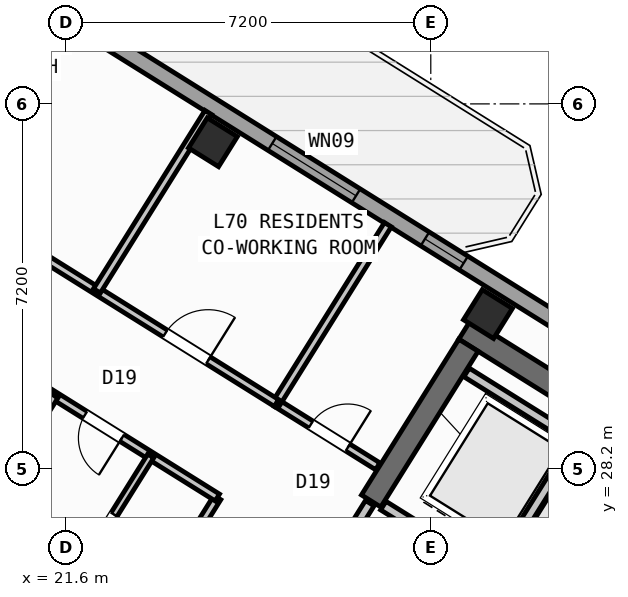
"""IFC4 building model, lengths in metres.
Left out: names, types, materials, properties, quantities, classifications, styles, units other than length and angle.
Written with IfcOpenShell. Run it as: python <this file> out.ifc"""

import sys

from ifc_helpers import new_model, si_unit, direction, frame, frame_2d, origin, origin_2d, place, context, subcontext, project, spatial, rectangle, hollow_rectangle, extrude, source, transform, mapped, element, fill, save


model = new_model("IFC4")
c1 = context("Model", 3, precision=1e-05, world=origin(), true_north=direction((0.0, 1.0)))
c2 = subcontext(c1, "Body", "Model", "MODEL_VIEW")
j1 = project(units=[si_unit("LENGTHUNIT", "METRE"), si_unit("PLANEANGLEUNIT", "RADIAN")], contexts=[c1])
p1 = place(None, origin())
s1 = spatial("IfcSite", under=j1, at=p1, CompositionType="ELEMENT")
p2 = place(p1, origin())
s2 = spatial("IfcBuilding", under=s1, at=p2, CompositionType="ELEMENT")
p3 = place(p2, frame((0.0, 0.0, 277.2)))
s3 = spatial("IfcBuildingStorey", under=s2, at=p3, CompositionType="ELEMENT", Elevation=277.2)
p4 = place(p3, frame((40.531, 24.036, 0.0), z_axis=(0.0, 0.0, 1.0), x_axis=(-0.848048787466, 0.529918157905, 0.0)))
e1 = element("IfcWall", 1, at=p4, inside=s3, PredefinedType="SHEAR", context=c2, shape_type="SweptSolid", body=[
    extrude(rectangle(XDim=13.04, YDim=0.45, at=frame_2d((6.52, 0.0))), origin(), (0.0, 0.0, 1.0), 3.35),
])
p5 = place(p3, frame((29.544, 30.636, 0.0), z_axis=(0.0, 0.0, 1.0), x_axis=(-0.529902075036, -0.848058836916, 0.0)))
e2 = element("IfcWall", 2, at=p5, inside=s3, PredefinedType="SHEAR", context=c2, shape_type="SweptSolid", body=[
    extrude(rectangle(XDim=3.625, YDim=0.45, at=frame_2d((1.812, 0.0))), origin(), (0.0, 0.0, 1.0), 3.35),
])
m1 = source(origin(), c2, "Body", "SweptSolid", [
    extrude(hollow_rectangle(XDim=0.7, YDim=0.7, WallThickness=0.028, at=origin_2d()), origin(), (0.0, 0.0, 1.0), 3.6),
])
for number, where, z_axis, x_axis in (
    (3, (29.928, 31.251, 0.0), (0.0, 0.0, 1.0), (-0.848, 0.53, 0.0)),
    (4, (24.5, 34.643, 0.0), (0.0, 0.0, 1.0), (-0.848, 0.53, 0.0)),
):
    element("IfcColumn", number, at=place(p3, frame(where, z_axis=z_axis, x_axis=x_axis)), inside=s3, PredefinedType="COLUMN", context=c2, shape_type="MappedRepresentation", body=[
        mapped(m1, transform((0.0, 0.0, 0.0), scale=1.0)),
    ])
p6 = place(p3, frame((14.138, 41.825, 0.0), z_axis=(0.0, 0.0, 1.0), x_axis=(0.848046498049, -0.529921821731, 0.0)))
e5 = element("IfcWall", 5, at=p6, inside=s3, PredefinedType="STANDARD", context=c2, shape_type="SweptSolid", body=[
    extrude(rectangle(XDim=31.588, YDim=0.32, at=frame_2d((15.794, 0.0))), origin(), (0.0, 0.0, 1.0), 3.35),
])
p7 = place(p6, frame((3.568, 0.0, 0.0)))
e6 = element("IfcOpeningElement", 6, at=p7, cuts=e5, PredefinedType="OPENING", context=c2, shape_type="SweptSolid", body=[
    extrude(rectangle(XDim=1.05, YDim=2.15, at=frame_2d((0.525, 1.075))), frame((0.0, 0.17, 0.0), z_axis=(0.0, -1.0, 0.0), x_axis=(1.0, 0.0, 0.0)), (0.0, 0.0, 1.0), 0.34),
])
p8 = place(p6, frame((1.046, 0.0, 0.9)))
e7 = element("IfcOpeningElement", 7, at=p8, cuts=e5, PredefinedType="OPENING", context=c2, shape_type="SweptSolid", body=[
    extrude(rectangle(XDim=1.65, YDim=1.45, at=frame_2d((0.825, 0.725))), frame((0.0, 0.17, 0.0), z_axis=(0.0, -1.0, 0.0), x_axis=(1.0, 0.0, 0.0)), (0.0, 0.0, 1.0), 0.34),
])
p9 = place(p6, frame((8.61, 0.0, 0.9)))
e8 = element("IfcOpeningElement", 8, at=p9, cuts=e5, PredefinedType="OPENING", context=c2, shape_type="SweptSolid", body=[
    extrude(rectangle(XDim=1.35, YDim=1.45, at=frame_2d((0.675, 0.725))), frame((0.0, 0.17, 0.0), z_axis=(0.0, -1.0, 0.0), x_axis=(1.0, 0.0, 0.0)), (0.0, 0.0, 1.0), 0.34),
])
p10 = place(p6, frame((13.599, 0.0, 0.95)))
e9 = element("IfcOpeningElement", 9, at=p10, cuts=e5, PredefinedType="OPENING", context=c2, shape_type="SweptSolid", body=[
    extrude(rectangle(XDim=1.95, YDim=1.35, at=frame_2d((0.975, 0.675))), frame((0.0, 0.17, 0.0), z_axis=(0.0, -1.0, 0.0), x_axis=(1.0, 0.0, 0.0)), (0.0, 0.0, 1.0), 0.34),
])
p11 = place(p6, frame((17.154, 0.0, 1.0)))
e10 = element("IfcOpeningElement", 10, at=p11, cuts=e5, PredefinedType="OPENING", context=c2, shape_type="SweptSolid", body=[
    extrude(rectangle(XDim=0.9, YDim=1.25, at=frame_2d((0.45, 0.625))), frame((0.0, 0.17, 0.0), z_axis=(0.0, -1.0, 0.0), x_axis=(1.0, 0.0, 0.0)), (0.0, 0.0, 1.0), 0.34),
])
p12 = place(p6, frame((21.719, 0.0, 0.9)))
e11 = element("IfcOpeningElement", 11, at=p12, cuts=e5, PredefinedType="OPENING", context=c2, shape_type="SweptSolid", body=[
    extrude(rectangle(XDim=1.65, YDim=1.45, at=frame_2d((0.825, 0.725))), frame((0.0, 0.17, 0.0), z_axis=(0.0, -1.0, 0.0), x_axis=(1.0, 0.0, 0.0)), (0.0, 0.0, 1.0), 0.34),
])
p13 = place(p6, frame((27.419, 0.0, 0.9)))
e12 = element("IfcOpeningElement", 12, at=p13, cuts=e5, PredefinedType="OPENING", context=c2, shape_type="SweptSolid", body=[
    extrude(rectangle(XDim=1.65, YDim=1.45, at=frame_2d((0.825, 0.725))), frame((0.0, 0.17, 0.0), z_axis=(0.0, -1.0, 0.0), x_axis=(1.0, 0.0, 0.0)), (0.0, 0.0, 1.0), 0.34),
])
p14 = place(p3, frame((31.822, 24.998, 0.0), z_axis=(0.0, 0.0, 1.0), x_axis=(-0.848054125777, 0.529909614701, 0.0)))
e13 = element("IfcWall", 13, at=p14, inside=s3, PredefinedType="STANDARD", context=c2, shape_type="SweptSolid", body=[
    extrude(rectangle(XDim=4.668, YDim=0.2, at=frame_2d((2.334, 0.0))), origin(), (0.0, 0.0, 1.0), 3.34),
])
p15 = place(p14, frame((0.52, 0.0, 0.0)))
e14 = element("IfcOpeningElement", 14, at=p15, cuts=e13, PredefinedType="OPENING", context=c2, shape_type="SweptSolid", body=[
    extrude(rectangle(XDim=1.2, YDim=2.15, at=frame_2d((0.6, 1.075))), frame((0.0, 0.11, 0.0), z_axis=(0.0, -1.0, 0.0), x_axis=(1.0, 0.0, 0.0)), (0.0, 0.0, 1.0), 0.22),
])
p16 = place(p14, frame((2.54, 0.0, 0.0)))
e15 = element("IfcOpeningElement", 15, at=p16, cuts=e13, PredefinedType="OPENING", context=c2, shape_type="SweptSolid", body=[
    extrude(rectangle(XDim=1.2, YDim=2.15, at=frame_2d((0.6, 1.075))), frame((0.0, 0.11, 0.0), z_axis=(0.0, -1.0, 0.0), x_axis=(1.0, 0.0, 0.0)), (0.0, 0.0, 1.0), 0.22),
])
p17 = place(p3, frame((31.645, 28.716, 0.0), z_axis=(0.0, 0.0, 1.0), x_axis=(-0.52986693015, -0.848080795876, 0.0)))
e16 = element("IfcWall", 16, at=p17, inside=s3, PredefinedType="STANDARD", context=c2, shape_type="SweptSolid", body=[
    extrude(rectangle(XDim=2.66, YDim=0.2, at=frame_2d((1.33, 0.0))), origin(), (0.0, 0.0, 1.0), 3.34),
])
p18 = place(p3, frame((33.363, 27.69, 0.0), z_axis=(0.0, 0.0, 1.0), x_axis=(-0.84804957148, 0.529916903215, 0.0)))
e17 = element("IfcWall", 17, at=p18, inside=s3, PredefinedType="STANDARD", context=c2, shape_type="SweptSolid", body=[
    extrude(rectangle(XDim=4.548, YDim=0.2, at=frame_2d((2.274, 0.0))), origin(), (0.0, 0.0, 1.0), 3.34),
])
p19 = place(p3, frame((27.596, 27.52, 0.0), z_axis=(0.0, 0.0, 1.0), x_axis=(-0.529865479138, -0.848081702443, 0.0)))
e18 = element("IfcWall", 18, at=p19, inside=s3, PredefinedType="STANDARD", context=c2, shape_type="SweptSolid", body=[
    extrude(rectangle(XDim=2.96, YDim=0.2, at=frame_2d((1.48, 0.0))), origin(), (0.0, 0.0, 1.0), 3.34),
])
p20 = place(p19, frame((0.7, 0.0, 0.0)))
e19 = element("IfcOpeningElement", 19, at=p20, cuts=e18, PredefinedType="OPENING", context=c2, shape_type="SweptSolid", body=[
    extrude(rectangle(XDim=1.5, YDim=2.15, at=frame_2d((0.75, 1.075))), frame((0.0, 0.11, 0.0), z_axis=(0.0, -1.0, 0.0), x_axis=(1.0, 0.0, 0.0)), (0.0, 0.0, 1.0), 0.22),
])
p21 = place(p3, frame((27.753, 28.247, 0.0), z_axis=(0.0, 0.0, 1.0), x_axis=(-0.848033204961, 0.529943094382, 0.0)))
e20 = element("IfcWall", 20, at=p21, inside=s3, PredefinedType="PARTITIONING", context=c2, shape_type="SweptSolid", body=[
    extrude(rectangle(XDim=2.358, YDim=0.16, at=frame_2d((1.179, 0.0))), origin(), (0.0, 0.0, 1.0), 3.34),
])
p22 = place(p21, frame((0.698, 0.0, 0.0)))
e21 = element("IfcOpeningElement", 21, at=p22, cuts=e20, PredefinedType="OPENING", context=c2, shape_type="SweptSolid", body=[
    extrude(rectangle(XDim=0.86, YDim=2.05, at=frame_2d((0.43, 1.025))), frame((0.0, 0.09, 0.0), z_axis=(0.0, -1.0, 0.0), x_axis=(1.0, 0.0, 0.0)), (0.0, 0.0, 1.0), 0.18),
])
p23 = place(p3, frame((27.953, 33.016, 0.0), z_axis=(0.0, 0.0, 1.0), x_axis=(-0.529872022255, -0.848077614391, 0.0)))
e22 = element("IfcWall", 22, at=p23, inside=s3, PredefinedType="PARTITIONING", context=c2, shape_type="SweptSolid", body=[
    extrude(rectangle(XDim=4.15, YDim=0.16, at=frame_2d((2.075, 0.0))), origin(), (0.0, 0.0, 1.0), 3.34),
])
p24 = place(p3, frame((24.588, 27.631, 0.0), z_axis=(0.0, 0.0, 1.0), x_axis=(-0.529914586043, -0.848051019396, 0.0)))
e23 = element("IfcWall", 23, at=p24, inside=s3, PredefinedType="PARTITIONING", context=c2, shape_type="SweptSolid", body=[
    extrude(rectangle(XDim=15.35, YDim=0.16, at=frame_2d((7.675, 0.0))), origin(), (0.0, 0.0, 1.0), 3.34),
])
p25 = place(p3, frame((25.754, 29.497, 0.0), z_axis=(0.0, 0.0, 1.0), x_axis=(-0.848045850158, 0.529922858565, 0.0)))
e24 = element("IfcWall", 24, at=p25, inside=s3, PredefinedType="PARTITIONING", context=c2, shape_type="SweptSolid", body=[
    extrude(rectangle(XDim=16.73, YDim=0.16, at=frame_2d((8.365, 0.0))), origin(), (0.0, 0.0, 1.0), 3.34),
])
p26 = place(p25, frame((1.588, 0.0, 0.0)))
e25 = element("IfcOpeningElement", 25, at=p26, cuts=e24, PredefinedType="OPENING", context=c2, shape_type="SweptSolid", body=[
    extrude(rectangle(XDim=1.0, YDim=2.1, at=frame_2d((0.5, 1.05))), frame((0.0, 0.09, 0.0), z_axis=(0.0, -1.0, 0.0), x_axis=(1.0, 0.0, 0.0)), (0.0, 0.0, 1.0), 0.18),
])
p27 = place(p25, frame((6.685, 0.0, 0.0)))
e26 = element("IfcOpeningElement", 26, at=p27, cuts=e24, PredefinedType="OPENING", context=c2, shape_type="SweptSolid", body=[
    extrude(rectangle(XDim=1.0, YDim=2.1, at=frame_2d((0.5, 1.05))), frame((0.0, 0.09, 0.0), z_axis=(0.0, -1.0, 0.0), x_axis=(1.0, 0.0, 0.0)), (0.0, 0.0, 1.0), 0.18),
])
p28 = place(p25, frame((12.951, 0.0, 0.0)))
e27 = element("IfcOpeningElement", 27, at=p28, cuts=e24, PredefinedType="OPENING", context=c2, shape_type="SweptSolid", body=[
    extrude(rectangle(XDim=1.0, YDim=2.1, at=frame_2d((0.5, 1.05))), frame((0.0, 0.09, 0.0), z_axis=(0.0, -1.0, 0.0), x_axis=(1.0, 0.0, 0.0)), (0.0, 0.0, 1.0), 0.18),
])
p29 = place(p3, frame((24.588, 27.631, 0.0), z_axis=(0.0, 0.0, 1.0), x_axis=(-0.848041752158, 0.529929416617, 0.0)))
e28 = element("IfcWall", 28, at=p29, inside=s3, PredefinedType="PARTITIONING", context=c2, shape_type="SweptSolid", body=[
    extrude(rectangle(XDim=16.73, YDim=0.16, at=frame_2d((8.365, 0.0))), origin(), (0.0, 0.0, 1.0), 3.34),
])
p30 = place(p29, frame((2.22, 0.0, 0.0)))
e29 = element("IfcOpeningElement", 29, at=p30, cuts=e28, PredefinedType="OPENING", context=c2, shape_type="SweptSolid", body=[
    extrude(rectangle(XDim=0.86, YDim=2.05, at=frame_2d((0.43, 1.025))), frame((0.0, 0.09, 0.0), z_axis=(0.0, -1.0, 0.0), x_axis=(1.0, 0.0, 0.0)), (0.0, 0.0, 1.0), 0.18),
])
p31 = place(p29, frame((7.82, 0.0, 0.0)))
e30 = element("IfcOpeningElement", 30, at=p31, cuts=e28, PredefinedType="OPENING", context=c2, shape_type="SweptSolid", body=[
    extrude(rectangle(XDim=1.0, YDim=2.1, at=frame_2d((0.5, 1.05))), frame((0.0, 0.09, 0.0), z_axis=(0.0, -1.0, 0.0), x_axis=(1.0, 0.0, 0.0)), (0.0, 0.0, 1.0), 0.18),
])
p32 = place(p29, frame((12.95, 0.0, 0.0)))
e31 = element("IfcOpeningElement", 31, at=p32, cuts=e28, PredefinedType="OPENING", context=c2, shape_type="SweptSolid", body=[
    extrude(rectangle(XDim=1.0, YDim=2.1, at=frame_2d((0.5, 1.05))), frame((0.0, 0.09, 0.0), z_axis=(0.0, -1.0, 0.0), x_axis=(1.0, 0.0, 0.0)), (0.0, 0.0, 1.0), 0.18),
])
p33 = place(p3, frame((21.374, 29.639, 0.0), z_axis=(0.0, 0.0, 1.0), x_axis=(-0.529872092657, -0.848077570405, 0.0)))
e32 = element("IfcWall", 32, at=p33, inside=s3, PredefinedType="PARTITIONING", context=c2, shape_type="SweptSolid", body=[
    extrude(rectangle(XDim=1.038, YDim=0.16, at=frame_2d((0.519, 0.0))), origin(), (0.0, 0.0, 1.0), 2.875),
])
p34 = place(p3, frame((23.273, 28.452, 0.0), z_axis=(0.0, 0.0, 1.0), x_axis=(-0.529867639402, -0.848080352747, 0.0)))
e33 = element("IfcWall", 33, at=p34, inside=s3, PredefinedType="PLUMBINGWALL", context=c2, shape_type="SweptSolid", body=[
    extrude(rectangle(XDim=3.51, YDim=0.14, at=frame_2d((1.755, 0.0))), origin(), (0.0, 0.0, 1.0), 3.025),
])
p35 = place(p34, frame((1.365, 0.0, 0.0)))
e34 = element("IfcOpeningElement", 34, at=p35, cuts=e33, PredefinedType="OPENING", context=c2, shape_type="SweptSolid", body=[
    extrude(rectangle(XDim=0.78, YDim=2.05, at=frame_2d((0.39, 1.025))), frame((0.0, 0.08, 0.0), z_axis=(0.0, -1.0, 0.0), x_axis=(1.0, 0.0, 0.0)), (0.0, 0.0, 1.0), 0.16),
])
p36 = place(p3, frame((24.411, 35.229, 0.0), z_axis=(0.0, 0.0, 1.0), x_axis=(-0.529940769753, -0.848034657637, 0.0)))
e35 = element("IfcWall", 35, at=p36, inside=s3, PredefinedType="PARTITIONING", context=c2, shape_type="SweptSolid", body=[
    extrude(rectangle(XDim=4.15, YDim=0.16, at=frame_2d((2.075, 0.0))), origin(), (0.0, 0.0, 1.0), 3.34),
])
m2 = source(origin(), c2, "Body", "SweptSolid", [
    extrude(rectangle(XDim=1.95, YDim=1.35, at=frame_2d((0.975, 0.675))), frame((0.0, 0.03, 0.0), z_axis=(0.0, -1.0, 0.0), x_axis=(1.0, 0.0, 0.0)), (0.0, 0.0, 1.0), 0.06),
])
p37 = place(p10, origin())
e36 = element("IfcWindow", 36, at=p37, inside=s3, PartitioningType="SINGLE_PANEL", PredefinedType="WINDOW", context=c2, shape_type="MappedRepresentation", body=[
    mapped(m2, transform((0.0, 0.0, 0.0), scale=1.0)),
])
fill(e9, e36)
m3 = source(origin(), c2, "Body", "SweptSolid", [
    extrude(rectangle(XDim=0.9, YDim=1.25, at=frame_2d((0.45, 0.625))), frame((0.0, 0.03, 0.0), z_axis=(0.0, -1.0, 0.0), x_axis=(1.0, 0.0, 0.0)), (0.0, 0.0, 1.0), 0.06),
])
p38 = place(p11, origin())
e37 = element("IfcWindow", 37, at=p38, inside=s3, PartitioningType="SINGLE_PANEL", PredefinedType="WINDOW", context=c2, shape_type="MappedRepresentation", body=[
    mapped(m3, transform((0.0, 0.0, 0.0), scale=1.0)),
])
fill(e10, e37)
m4 = source(origin(), c2, "Body", "SweptSolid", [
    extrude(rectangle(XDim=0.86, YDim=2.05, at=frame_2d((0.43, 1.025))), frame((0.0, 0.025, 0.0), z_axis=(0.0, -1.0, 0.0), x_axis=(1.0, 0.0, 0.0)), (0.0, 0.0, 1.0), 0.05),
])
p39 = place(p22, frame((0.86, 0.0, 0.0), z_axis=(0.0, 0.0, 1.0), x_axis=(-1.0, 0.0, 0.0)))
e38 = element("IfcDoor", 38, at=p39, inside=s3, OperationType="SINGLE_SWING_RIGHT", PredefinedType="DOOR", context=c2, shape_type="MappedRepresentation", body=[
    mapped(m4, transform((0.0, 0.0, 0.0), scale=1.0)),
])
fill(e21, e38)
p40 = place(p30, origin())
e39 = element("IfcDoor", 39, at=p40, inside=s3, OperationType="SINGLE_SWING_LEFT", PredefinedType="DOOR", context=c2, shape_type="MappedRepresentation", body=[
    mapped(m4, transform((0.0, 0.0, 0.0), scale=1.0)),
])
fill(e29, e39)
m5 = source(origin(), c2, "Body", "SweptSolid", [
    extrude(rectangle(XDim=0.78, YDim=2.05, at=frame_2d((0.39, 1.025))), frame((0.0, 0.025, 0.0), z_axis=(0.0, -1.0, 0.0), x_axis=(1.0, 0.0, 0.0)), (0.0, 0.0, 1.0), 0.05),
])
p41 = place(p35, origin())
e40 = element("IfcDoor", 40, at=p41, inside=s3, OperationType="SINGLE_SWING_LEFT", PredefinedType="DOOR", context=c2, shape_type="MappedRepresentation", body=[
    mapped(m5, transform((0.0, 0.0, 0.0), scale=1.0)),
])
fill(e34, e40)
m6 = source(origin(), c2, "Body", "SweptSolid", [
    extrude(rectangle(XDim=1.0, YDim=2.1, at=frame_2d((0.5, 1.05))), frame((0.0, 0.025, 0.0), z_axis=(0.0, -1.0, 0.0), x_axis=(1.0, 0.0, 0.0)), (0.0, 0.0, 1.0), 0.05),
])
p42 = place(p26, frame((1.0, 0.0, 0.0), z_axis=(0.0, 0.0, 1.0), x_axis=(-1.0, 0.0, 0.0)))
e41 = element("IfcDoor", 41, at=p42, inside=s3, OperationType="SINGLE_SWING_RIGHT", PredefinedType="DOOR", context=c2, shape_type="MappedRepresentation", body=[
    mapped(m6, transform((0.0, 0.0, 0.0), scale=1.0)),
])
fill(e25, e41)
save(model, sys.argv[1])
